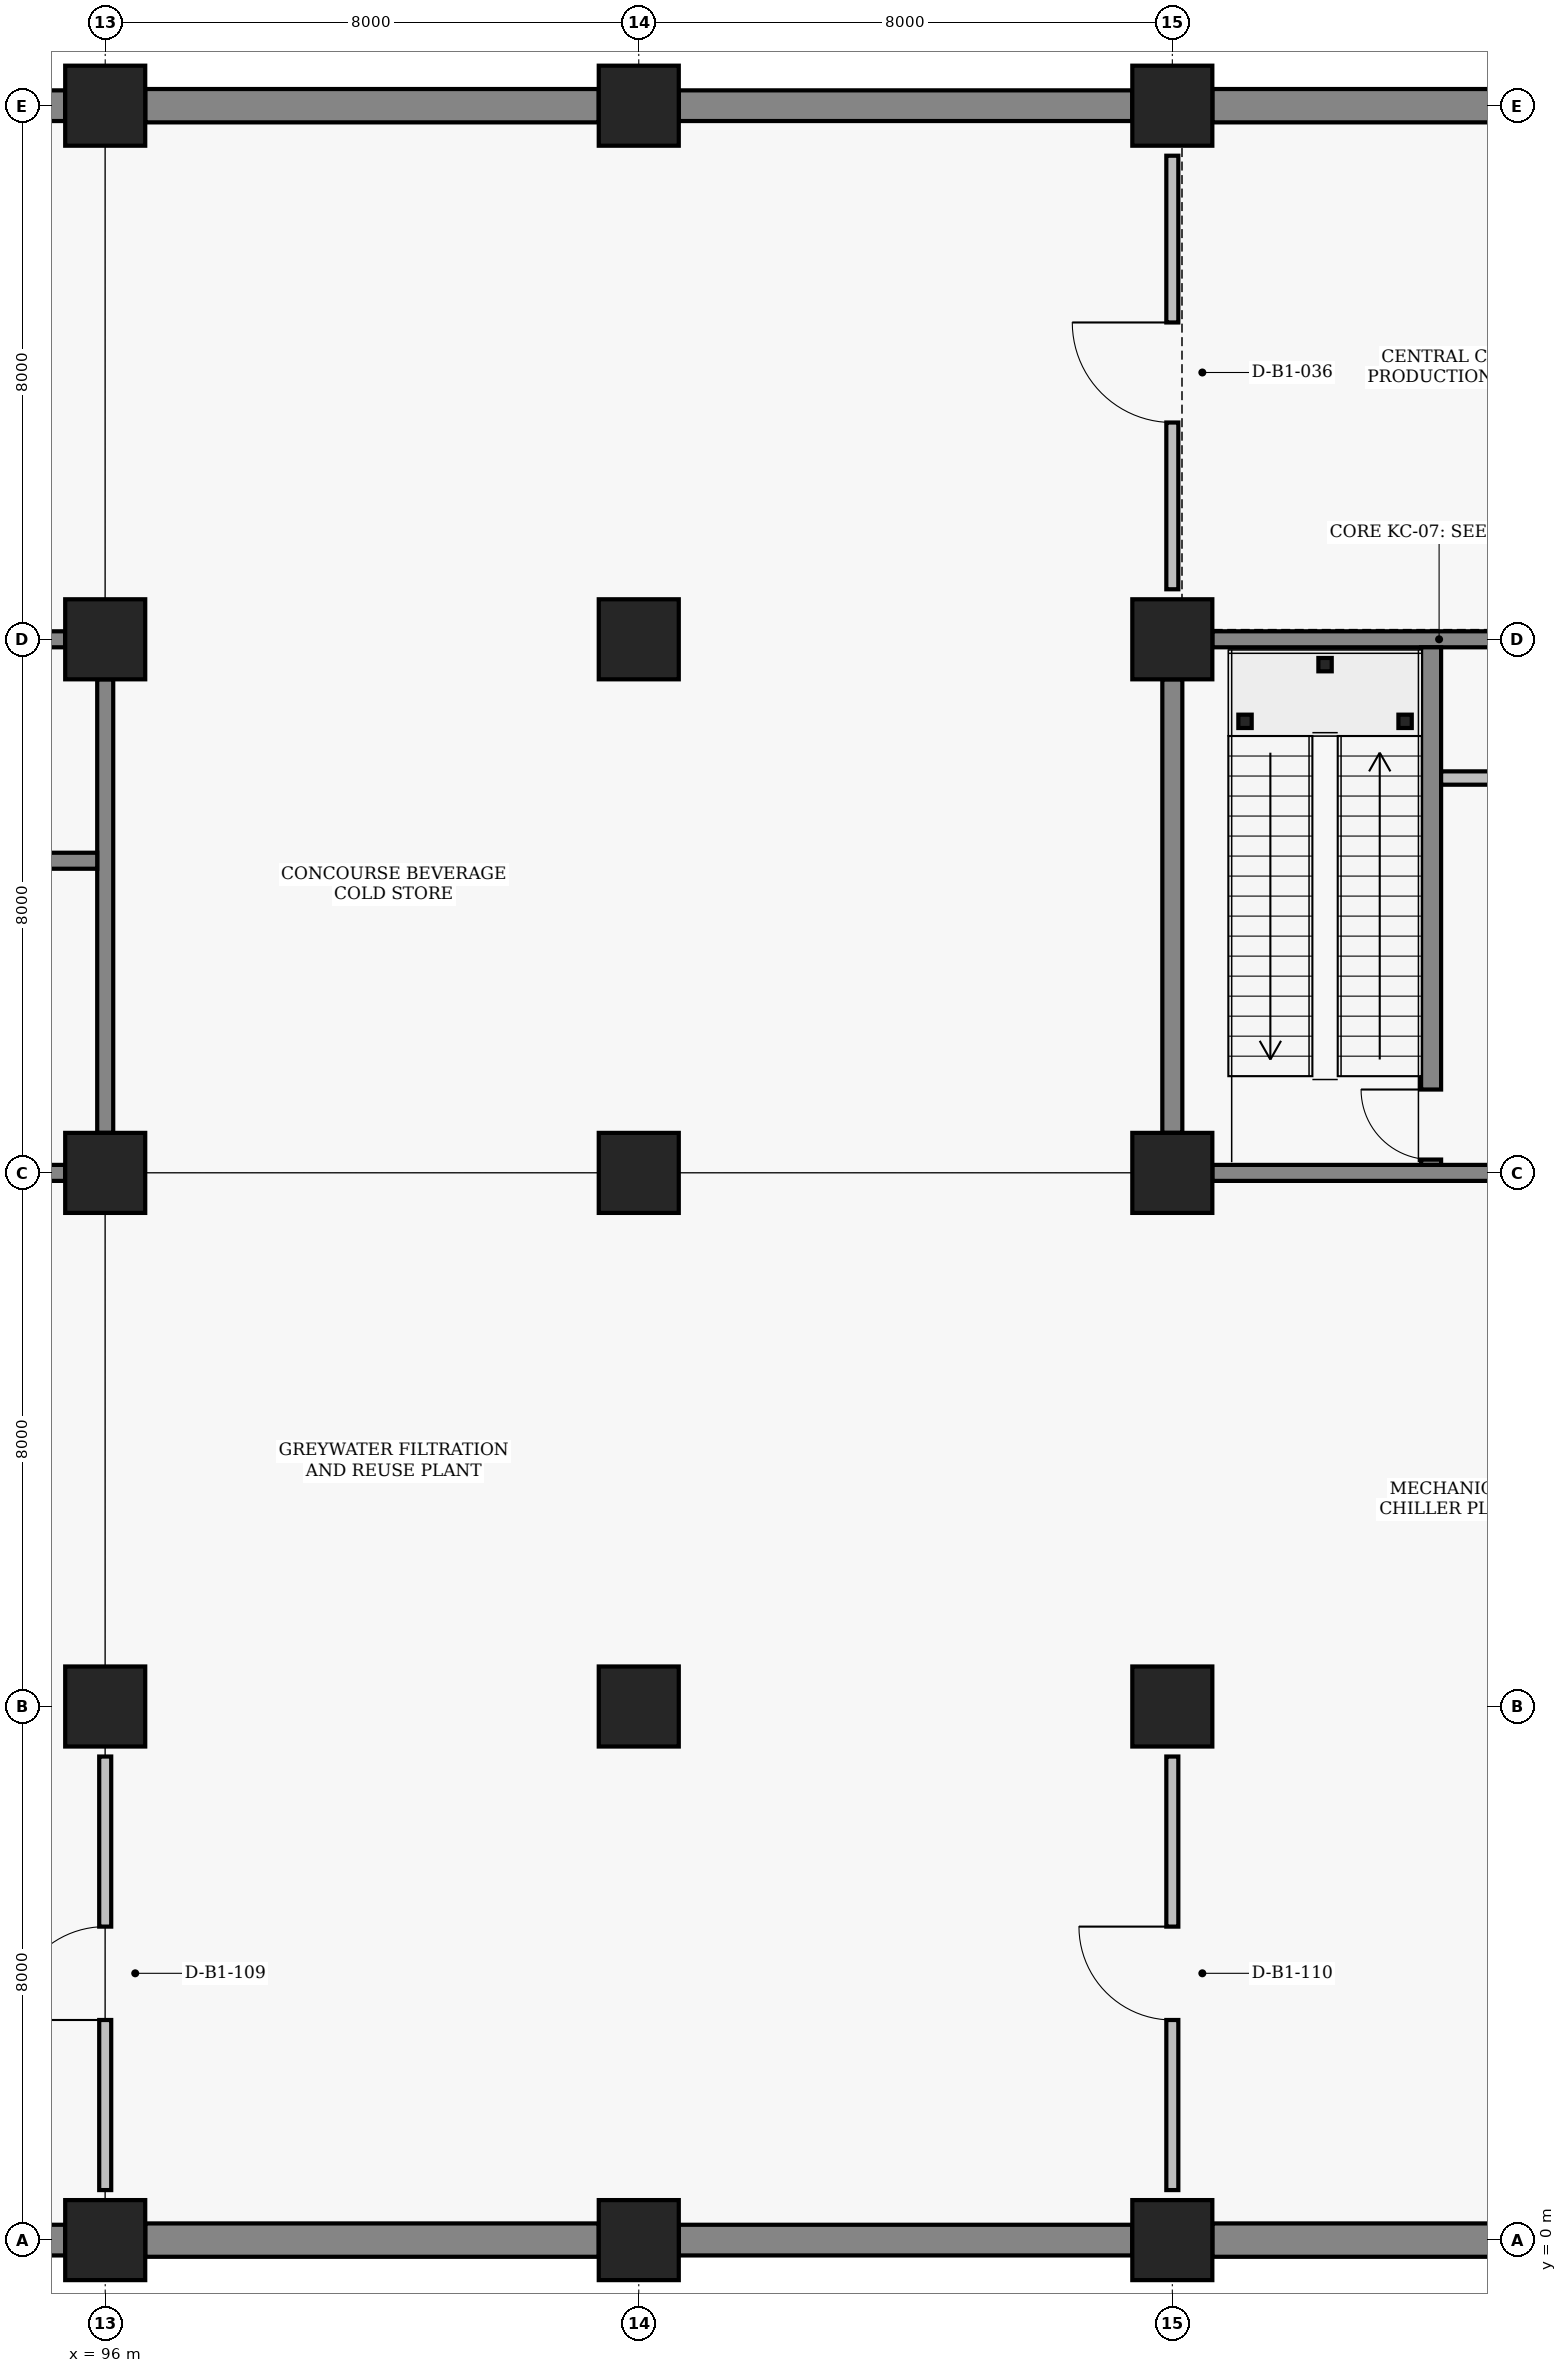
"""IFC4 building model, lengths in metres.
Left out: names, types, materials, properties, quantities, classifications, styles, units other than length and angle.
Written with IfcOpenShell. Run it as: python <this file> out.ifc"""

import sys

from ifc_helpers import new_model, si_unit, direction, frame, frame_2d, origin, origin_2d, place, context, subcontext, project, spatial, rectangle, hollow_rectangle, extrude, element, fill, save


model = new_model("IFC4")
c1 = context("Model", 3, precision=1e-05, world=origin(), true_north=direction((0.0, 1.0)))
c2 = subcontext(c1, "Body", "Model", "MODEL_VIEW")
j1 = project(units=[si_unit("LENGTHUNIT", "METRE"), si_unit("PLANEANGLEUNIT", "RADIAN")], contexts=[c1])
p1 = place(None, origin())
s1 = spatial("IfcSite", under=j1, at=p1, CompositionType="ELEMENT")
p2 = place(p1, origin())
s2 = spatial("IfcBuilding", under=s1, at=p2, CompositionType="ELEMENT")
p3 = place(p2, frame((0.0, 0.0, -5.4)))
s3 = spatial("IfcBuildingStorey", under=s2, at=p3, CompositionType="ELEMENT", Elevation=-5.4)
for number, where, z_axis, x_axis in (
    (1, (96.0, 0.0, 0.0), (0.0, 0.0, 1.0), (1.0, 0.0, 0.0)),
    (2, (96.0, 8.0, 0.0), (0.0, 0.0, 1.0), (1.0, 0.0, 0.0)),
    (3, (96.0, 16.0, 0.0), (0.0, 0.0, 1.0), (1.0, 0.0, 0.0)),
    (4, (96.0, 24.0, 0.0), (0.0, 0.0, 1.0), (1.0, 0.0, 0.0)),
    (5, (96.0, 32.0, 0.0), (0.0, 0.0, 1.0), (1.0, 0.0, 0.0)),
    (6, (104.0, 0.0, 0.0), (0.0, 0.0, 1.0), (1.0, 0.0, 0.0)),
    (7, (104.0, 8.0, 0.0), (0.0, 0.0, 1.0), (1.0, 0.0, 0.0)),
    (8, (104.0, 16.0, 0.0), (0.0, 0.0, 1.0), (1.0, 0.0, 0.0)),
    (9, (104.0, 24.0, 0.0), (0.0, 0.0, 1.0), (1.0, 0.0, 0.0)),
    (10, (104.0, 32.0, 0.0), (0.0, 0.0, 1.0), (1.0, 0.0, 0.0)),
    (11, (112.0, 0.0, 0.0), (0.0, 0.0, 1.0), (1.0, 0.0, 0.0)),
    (12, (112.0, 8.0, 0.0), (0.0, 0.0, 1.0), (1.0, 0.0, 0.0)),
    (13, (112.0, 16.0, 0.0), (0.0, 0.0, 1.0), (1.0, 0.0, 0.0)),
    (14, (112.0, 24.0, 0.0), (0.0, 0.0, 1.0), (1.0, 0.0, 0.0)),
    (15, (112.0, 32.0, 0.0), (0.0, 0.0, 1.0), (1.0, 0.0, 0.0)),
):
    element("IfcColumn", number, at=place(p3, frame(where, z_axis=z_axis, x_axis=x_axis)), inside=s3, PredefinedType="COLUMN", context=c2, shape_type="SweptSolid", body=[
        extrude(rectangle(XDim=1.2, YDim=1.2, at=origin_2d()), origin(), (0.0, 0.0, 1.0), 5.4),
    ])
p4 = place(p3, frame((88.6, 0.0, 0.0), z_axis=(0.0, 0.0, 1.0), x_axis=(1.0, 0.0, 0.0)))
e16 = element("IfcWall", 16, at=p4, inside=s3, PredefinedType="STANDARD", context=c2, shape_type="SweptSolid", body=[
    extrude(rectangle(XDim=6.8, YDim=0.46, at=frame_2d((3.4, 0.0))), origin(), (0.0, 0.0, 1.0), 4.29),
])
p5 = place(p3, frame((88.6, 32.0, 0.0), z_axis=(0.0, 0.0, 1.0), x_axis=(1.0, 0.0, 0.0)))
e17 = element("IfcWall", 17, at=p5, inside=s3, PredefinedType="STANDARD", context=c2, shape_type="SweptSolid", body=[
    extrude(rectangle(XDim=6.8, YDim=0.46, at=frame_2d((3.4, 0.0))), origin(), (0.0, 0.0, 1.0), 4.34),
])
p6 = place(p3, frame((96.6, 0.0, 0.0), z_axis=(0.0, 0.0, 1.0), x_axis=(1.0, 0.0, 0.0)))
e18 = element("IfcWall", 18, at=p6, inside=s3, PredefinedType="STANDARD", context=c2, shape_type="SweptSolid", body=[
    extrude(rectangle(XDim=6.8, YDim=0.5, at=frame_2d((3.4, 0.0))), origin(), (0.0, 0.0, 1.0), 4.29),
])
p7 = place(p3, frame((96.6, 32.0, 0.0), z_axis=(0.0, 0.0, 1.0), x_axis=(1.0, 0.0, 0.0)))
e19 = element("IfcWall", 19, at=p7, inside=s3, PredefinedType="STANDARD", context=c2, shape_type="SweptSolid", body=[
    extrude(rectangle(XDim=6.8, YDim=0.5, at=frame_2d((3.4, 0.0))), origin(), (0.0, 0.0, 1.0), 4.34),
])
p8 = place(p3, frame((104.6, 0.0, 0.0), z_axis=(0.0, 0.0, 1.0), x_axis=(1.0, 0.0, 0.0)))
e20 = element("IfcWall", 20, at=p8, inside=s3, PredefinedType="STANDARD", context=c2, shape_type="SweptSolid", body=[
    extrude(rectangle(XDim=6.8, YDim=0.46, at=frame_2d((3.4, 0.0))), origin(), (0.0, 0.0, 1.0), 4.29),
])
p9 = place(p3, frame((104.6, 32.0, 0.0), z_axis=(0.0, 0.0, 1.0), x_axis=(1.0, 0.0, 0.0)))
e21 = element("IfcWall", 21, at=p9, inside=s3, PredefinedType="STANDARD", context=c2, shape_type="SweptSolid", body=[
    extrude(rectangle(XDim=6.8, YDim=0.46, at=frame_2d((3.4, 0.0))), origin(), (0.0, 0.0, 1.0), 4.34),
])
p10 = place(p3, frame((112.6, 0.0, 0.0), z_axis=(0.0, 0.0, 1.0), x_axis=(1.0, 0.0, 0.0)))
e22 = element("IfcWall", 22, at=p10, inside=s3, PredefinedType="STANDARD", context=c2, shape_type="SweptSolid", body=[
    extrude(rectangle(XDim=6.8, YDim=0.5, at=frame_2d((3.4, 0.0))), origin(), (0.0, 0.0, 1.0), 4.29),
])
p11 = place(p3, frame((112.6, 32.0, 0.0), z_axis=(0.0, 0.0, 1.0), x_axis=(1.0, 0.0, 0.0)))
e23 = element("IfcWall", 23, at=p11, inside=s3, PredefinedType="STANDARD", context=c2, shape_type="SweptSolid", body=[
    extrude(rectangle(XDim=6.8, YDim=0.5, at=frame_2d((3.4, 0.0))), origin(), (0.0, 0.0, 1.0), 4.34),
])
p12 = place(p3, frame((88.6, 16.0, 0.0), z_axis=(0.0, 0.0, 1.0), x_axis=(1.0, 0.0, 0.0)))
e24 = element("IfcWall", 24, at=p12, inside=s3, PredefinedType="SHEAR", context=c2, shape_type="SweptSolid", body=[
    extrude(rectangle(XDim=6.8, YDim=0.24, at=frame_2d((3.4, 0.0))), origin(), (0.0, 0.0, 1.0), 3.64),
])
p13 = place(p12, frame((4.65, 0.0, 0.0)))
e25 = element("IfcOpeningElement", 25, at=p13, cuts=e24, PredefinedType="OPENING", context=c2, shape_type="SweptSolid", body=[
    extrude(rectangle(XDim=1.1, YDim=2.2, at=frame_2d((0.55, 1.1))), frame((0.0, 0.13, 0.0), z_axis=(0.0, -1.0, 0.0), x_axis=(1.0, 0.0, 0.0)), (0.0, 0.0, 1.0), 0.26),
])
p14 = place(p3, frame((88.6, 24.0, 0.0), z_axis=(0.0, 0.0, 1.0), x_axis=(1.0, 0.0, 0.0)))
e26 = element("IfcWall", 26, at=p14, inside=s3, PredefinedType="SHEAR", context=c2, shape_type="SweptSolid", body=[
    extrude(rectangle(XDim=6.8, YDim=0.24, at=frame_2d((3.4, 0.0))), origin(), (0.0, 0.0, 1.0), 4.59),
])
p15 = place(p3, frame((96.0, 16.6, 0.0), z_axis=(0.0, 0.0, 1.0), x_axis=(0.0, 1.0, 0.0)))
e27 = element("IfcWall", 27, at=p15, inside=s3, PredefinedType="SHEAR", context=c2, shape_type="SweptSolid", body=[
    extrude(rectangle(XDim=6.8, YDim=0.24, at=frame_2d((3.4, 0.0))), origin(), (0.0, 0.0, 1.0), 3.64),
])
p16 = place(p3, frame((92.0, 20.68, 0.0), z_axis=(0.0, 0.0, 1.0), x_axis=(1.0, 0.0, 0.0)))
e28 = element("IfcWall", 28, at=p16, inside=s3, PredefinedType="SHEAR", context=c2, shape_type="SweptSolid", body=[
    extrude(rectangle(XDim=3.88, YDim=0.24, at=frame_2d((1.94, 0.0))), origin(), (0.0, 0.0, 1.0), 4.39),
])
p17 = place(p16, frame((1.0, 0.0, 0.0)))
e29 = element("IfcOpeningElement", 29, at=p17, cuts=e28, PredefinedType="OPENING", context=c2, shape_type="SweptSolid", body=[
    extrude(rectangle(XDim=1.1, YDim=2.15, at=frame_2d((0.55, 1.075))), frame((0.0, 0.13, 0.0), z_axis=(0.0, -1.0, 0.0), x_axis=(1.0, 0.0, 0.0)), (0.0, 0.0, 1.0), 0.26),
])
p18 = place(p3, frame((112.6, 16.0, 0.0), z_axis=(0.0, 0.0, 1.0), x_axis=(1.0, 0.0, 0.0)))
e30 = element("IfcWall", 30, at=p18, inside=s3, PredefinedType="SHEAR", context=c2, shape_type="SweptSolid", body=[
    extrude(rectangle(XDim=6.8, YDim=0.24, at=frame_2d((3.4, 0.0))), origin(), (0.0, 0.0, 1.0), 4.54),
])
p19 = place(p18, frame((4.65, 0.0, 0.0)))
e31 = element("IfcOpeningElement", 31, at=p19, cuts=e30, PredefinedType="OPENING", context=c2, shape_type="SweptSolid", body=[
    extrude(rectangle(XDim=1.1, YDim=2.2, at=frame_2d((0.55, 1.1))), frame((0.0, 0.13, 0.0), z_axis=(0.0, -1.0, 0.0), x_axis=(1.0, 0.0, 0.0)), (0.0, 0.0, 1.0), 0.26),
])
p20 = place(p3, frame((112.6, 24.0, 0.0), z_axis=(0.0, 0.0, 1.0), x_axis=(1.0, 0.0, 0.0)))
e32 = element("IfcWall", 32, at=p20, inside=s3, PredefinedType="SHEAR", context=c2, shape_type="SweptSolid", body=[
    extrude(rectangle(XDim=6.8, YDim=0.24, at=frame_2d((3.4, 0.0))), origin(), (0.0, 0.0, 1.0), 4.59),
])
p21 = place(p3, frame((112.0, 16.6, 0.0), z_axis=(0.0, 0.0, 1.0), x_axis=(0.0, 1.0, 0.0)))
e33 = element("IfcWall", 33, at=p21, inside=s3, PredefinedType="SHEAR", context=c2, shape_type="SweptSolid", body=[
    extrude(rectangle(XDim=6.8, YDim=0.3, at=frame_2d((3.4, 0.0))), origin(), (0.0, 0.0, 1.0), 4.39),
])
p22 = place(p3, frame((115.88, 16.12, 0.0), z_axis=(0.0, 0.0, 1.0), x_axis=(0.0, 1.0, 0.0)))
e34 = element("IfcWall", 34, at=p22, inside=s3, PredefinedType="SHEAR", context=c2, shape_type="SweptSolid", body=[
    extrude(rectangle(XDim=7.76, YDim=0.3, at=frame_2d((3.88, 0.0))), origin(), (0.0, 0.0, 1.0), 4.54),
])
p23 = place(p22, frame((0.08, 0.0, 0.0)))
e35 = element("IfcOpeningElement", 35, at=p23, cuts=e34, PredefinedType="OPENING", context=c2, shape_type="SweptSolid", body=[
    extrude(rectangle(XDim=1.05, YDim=2.15, at=frame_2d((0.525, 1.075))), frame((0.0, 0.16, 0.0), z_axis=(0.0, -1.0, 0.0), x_axis=(1.0, 0.0, 0.0)), (0.0, 0.0, 1.0), 0.32),
])
p24 = place(p3, frame((116.03, 21.92, 0.0), z_axis=(0.0, 0.0, 1.0), x_axis=(1.0, 0.0, 0.0)))
e36 = element("IfcWall", 36, at=p24, inside=s3, PredefinedType="PARTITIONING", context=c2, shape_type="SweptSolid", body=[
    extrude(rectangle(XDim=3.82, YDim=0.2, at=frame_2d((1.91, 0.0))), origin(), (0.0, 0.0, 1.0), 4.39),
])
p25 = place(p24, frame((1.25, 0.0, 0.0)))
e37 = element("IfcOpeningElement", 37, at=p25, cuts=e36, PredefinedType="OPENING", context=c2, shape_type="SweptSolid", body=[
    extrude(rectangle(XDim=0.85, YDim=2.05, at=frame_2d((0.425, 1.025))), frame((0.0, 0.11, 0.0), z_axis=(0.0, -1.0, 0.0), x_axis=(1.0, 0.0, 0.0)), (0.0, 0.0, 1.0), 0.22),
])
for number, where, z_axis, x_axis in (
    (38, (113.09, 22.77, 0.0), (0.0, 0.0, 1.0), (1.0, 0.0, 0.0)),
    (39, (115.49, 22.77, 0.0), (0.0, 0.0, 1.0), (1.0, 0.0, 0.0)),
    (40, (114.29, 23.62, 0.0), (0.0, 0.0, 1.0), (1.0, 0.0, 0.0)),
):
    element("IfcColumn", number, at=place(p3, frame(where, z_axis=z_axis, x_axis=x_axis)), inside=s3, PredefinedType="COLUMN", context=c2, shape_type="SweptSolid", body=[
        extrude(hollow_rectangle(XDim=0.2, YDim=0.2, WallThickness=0.009, at=origin_2d()), origin(), (0.0, 0.0, 1.0), 2.5),
    ])
p26 = place(p3, frame((112.0, 24.75, 0.0), z_axis=(0.0, 0.0, 1.0), x_axis=(0.0, 1.0, 0.0)))
e41 = element("IfcWall", 41, at=p26, inside=s3, PredefinedType="PARTITIONING", context=c2, shape_type="SweptSolid", body=[
    extrude(rectangle(XDim=6.5, YDim=0.18, at=frame_2d((3.25, 0.0))), origin(), (0.0, 0.0, 1.0), 4.39),
])
p27 = place(p26, frame((2.5, 0.0, 0.0)))
e42 = element("IfcOpeningElement", 42, at=p27, cuts=e41, PredefinedType="OPENING", context=c2, shape_type="SweptSolid", body=[
    extrude(rectangle(XDim=1.5, YDim=2.2, at=frame_2d((0.75, 1.1))), frame((0.0, 0.1, 0.0), z_axis=(0.0, -1.0, 0.0), x_axis=(1.0, 0.0, 0.0)), (0.0, 0.0, 1.0), 0.2),
])
p28 = place(p3, frame((96.0, 0.75, 0.0), z_axis=(0.0, 0.0, 1.0), x_axis=(0.0, 1.0, 0.0)))
e43 = element("IfcWall", 43, at=p28, inside=s3, PredefinedType="PARTITIONING", context=c2, shape_type="SweptSolid", body=[
    extrude(rectangle(XDim=6.5, YDim=0.18, at=frame_2d((3.25, 0.0))), origin(), (0.0, 0.0, 1.0), 4.34),
])
p29 = place(p28, frame((2.55, 0.0, 0.0)))
e44 = element("IfcOpeningElement", 44, at=p29, cuts=e43, PredefinedType="OPENING", context=c2, shape_type="SweptSolid", body=[
    extrude(rectangle(XDim=1.4, YDim=2.2, at=frame_2d((0.7, 1.1))), frame((0.0, 0.1, 0.0), z_axis=(0.0, -1.0, 0.0), x_axis=(1.0, 0.0, 0.0)), (0.0, 0.0, 1.0), 0.2),
])
p30 = place(p3, frame((112.0, 0.75, 0.0), z_axis=(0.0, 0.0, 1.0), x_axis=(0.0, 1.0, 0.0)))
e45 = element("IfcWall", 45, at=p30, inside=s3, PredefinedType="PARTITIONING", context=c2, shape_type="SweptSolid", body=[
    extrude(rectangle(XDim=6.5, YDim=0.18, at=frame_2d((3.25, 0.0))), origin(), (0.0, 0.0, 1.0), 3.64),
])
p31 = place(p30, frame((2.55, 0.0, 0.0)))
e46 = element("IfcOpeningElement", 46, at=p31, cuts=e45, PredefinedType="OPENING", context=c2, shape_type="SweptSolid", body=[
    extrude(rectangle(XDim=1.4, YDim=2.2, at=frame_2d((0.7, 1.1))), frame((0.0, 0.1, 0.0), z_axis=(0.0, -1.0, 0.0), x_axis=(1.0, 0.0, 0.0)), (0.0, 0.0, 1.0), 0.2),
])
p32 = place(p23, origin())
e47 = element("IfcDoor", 47, at=p32, inside=s3, OperationType="SINGLE_SWING_RIGHT", PredefinedType="DOOR", context=c2, shape_type="SweptSolid", body=[
    extrude(rectangle(XDim=1.05, YDim=2.15, at=frame_2d((0.525, 1.075))), frame((0.0, 0.025, 0.0), z_axis=(0.0, -1.0, 0.0), x_axis=(1.0, 0.0, 0.0)), (0.0, 0.0, 1.0), 0.05),
])
fill(e35, e47)
p33 = place(p27, origin())
e48 = element("IfcDoor", 48, at=p33, inside=s3, OperationType="SINGLE_SWING_RIGHT", PredefinedType="DOOR", context=c2, shape_type="SweptSolid", body=[
    extrude(rectangle(XDim=1.5, YDim=2.2, at=frame_2d((0.75, 1.1))), frame((0.0, 0.025, 0.0), z_axis=(0.0, -1.0, 0.0), x_axis=(1.0, 0.0, 0.0)), (0.0, 0.0, 1.0), 0.05),
])
fill(e42, e48)
p34 = place(p29, origin())
e49 = element("IfcDoor", 49, at=p34, inside=s3, OperationType="SINGLE_SWING_LEFT", PredefinedType="DOOR", context=c2, shape_type="SweptSolid", body=[
    extrude(rectangle(XDim=1.4, YDim=2.2, at=frame_2d((0.7, 1.1))), frame((0.0, 0.025, 0.0), z_axis=(0.0, -1.0, 0.0), x_axis=(1.0, 0.0, 0.0)), (0.0, 0.0, 1.0), 0.05),
])
fill(e44, e49)
p35 = place(p31, origin())
e50 = element("IfcDoor", 50, at=p35, inside=s3, OperationType="SINGLE_SWING_RIGHT", PredefinedType="DOOR", context=c2, shape_type="SweptSolid", body=[
    extrude(rectangle(XDim=1.4, YDim=2.2, at=frame_2d((0.7, 1.1))), frame((0.0, 0.025, 0.0), z_axis=(0.0, -1.0, 0.0), x_axis=(1.0, 0.0, 0.0)), (0.0, 0.0, 1.0), 0.05),
])
fill(e46, e50)
save(model, sys.argv[1])
